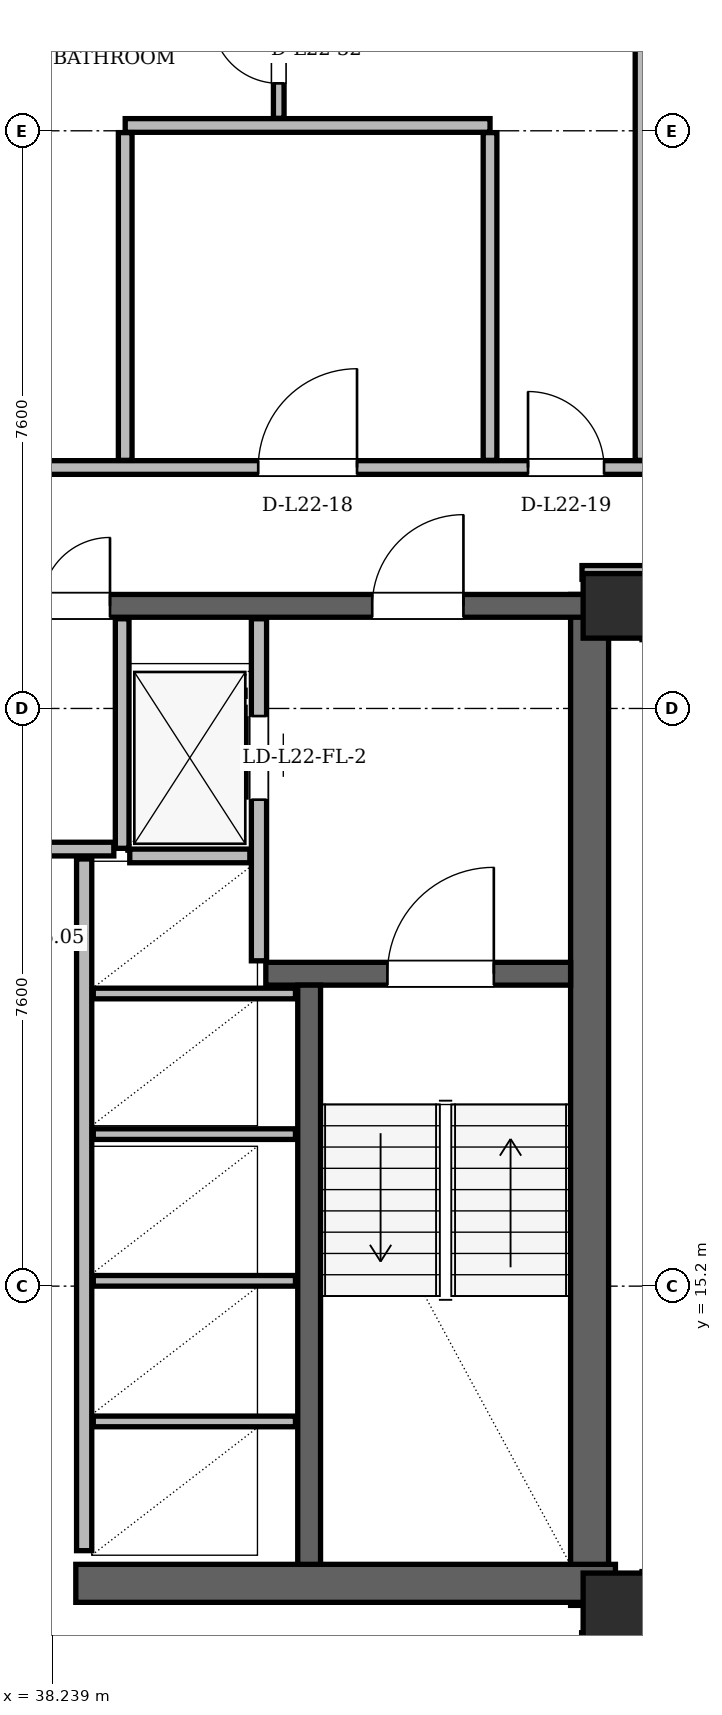
"""IFC4 building model, lengths in metres.
Left out: names, types, materials, properties, quantities, classifications, styles, units other than length and angle.
Written with IfcOpenShell. Run it as: python <this file> out.ifc"""

import sys

from ifc_helpers import new_model, si_unit, direction, frame, frame_2d, origin, origin_2d, place, context, subcontext, project, spatial, rectangle, hollow_rectangle, extrude, element, fill, save


model = new_model("IFC4")
c1 = context("Model", 3, precision=1e-05, world=origin(), true_north=direction((0.0, 1.0)))
c2 = subcontext(c1, "Body", "Model", "MODEL_VIEW")
j1 = project(units=[si_unit("LENGTHUNIT", "METRE"), si_unit("PLANEANGLEUNIT", "RADIAN")], contexts=[c1])
p1 = place(None, origin())
s1 = spatial("IfcSite", under=j1, at=p1, CompositionType="ELEMENT")
p2 = place(p1, origin())
s2 = spatial("IfcBuilding", under=s1, at=p2, CompositionType="ELEMENT")
p3 = place(p2, frame((0.0, 0.0, 86.1)))
s3 = spatial("IfcBuildingStorey", under=s2, at=p3, CompositionType="ELEMENT", Elevation=86.1)
for number, where, z_axis, x_axis in (
    (1, (45.65, 11.0, 0.0), (0.0, 0.0, 1.0), (1.0, 0.0, 0.0)),
    (2, (45.65, 24.15, 0.0), (0.0, 0.0, 1.0), (1.0, 0.0, 0.0)),
):
    element("IfcColumn", number, at=place(p3, frame(where, z_axis=z_axis, x_axis=x_axis)), inside=s3, PredefinedType="COLUMN", context=c2, shape_type="SweptSolid", body=[
        extrude(hollow_rectangle(XDim=0.85, YDim=0.85, WallThickness=0.07, at=origin_2d()), origin(), (0.0, 0.0, 1.0), 3.6),
    ])
p4 = place(p3, frame((45.31, 11.0, 0.0), z_axis=(0.0, 0.0, 1.0), x_axis=(0.0, 1.0, 0.0)))
e3 = element("IfcWall", 3, at=p4, inside=s3, PredefinedType="SHEAR", context=c2, shape_type="SweptSolid", body=[
    extrude(rectangle(XDim=13.3, YDim=0.5, at=frame_2d((6.65, 0.0))), origin(), (0.0, 0.0, 1.0), 3.36),
])
p5 = place(p3, frame((38.55, 11.29, 0.0), z_axis=(0.0, 0.0, 1.0), x_axis=(1.0, 0.0, 0.0)))
e4 = element("IfcWall", 4, at=p5, inside=s3, PredefinedType="SHEAR", context=c2, shape_type="SweptSolid", body=[
    extrude(rectangle(XDim=7.1, YDim=0.5, at=frame_2d((3.55, 0.0))), origin(), (0.0, 0.0, 1.0), 3.36),
])
p6 = place(p3, frame((29.65, 24.15, 0.0), z_axis=(0.0, 0.0, 1.0), x_axis=(1.0, 0.0, 0.0)))
e5 = element("IfcWall", 5, at=p6, inside=s3, PredefinedType="SHEAR", context=c2, shape_type="SweptSolid", body=[
    extrude(rectangle(XDim=15.7, YDim=0.3, at=frame_2d((7.85, 0.0))), origin(), (0.0, 0.0, 1.0), 3.36),
])
p7 = place(p6, frame((1.7, 0.0, 0.0)))
e6 = element("IfcOpeningElement", 6, at=p7, cuts=e5, PredefinedType="OPENING", context=c2, shape_type="SweptSolid", body=[
    extrude(rectangle(XDim=1.2, YDim=2.2, at=frame_2d((0.6, 1.1))), frame((0.0, 0.15, 0.0), z_axis=(0.0, -1.0, 0.0), x_axis=(1.0, 0.0, 0.0)), (0.0, 0.0, 1.0), 0.3),
])
p8 = place(p6, frame((12.8, 0.0, 0.0)))
e7 = element("IfcOpeningElement", 7, at=p8, cuts=e5, PredefinedType="OPENING", context=c2, shape_type="SweptSolid", body=[
    extrude(rectangle(XDim=1.2, YDim=2.2, at=frame_2d((0.6, 1.1))), frame((0.0, 0.15, 0.0), z_axis=(0.0, -1.0, 0.0), x_axis=(1.0, 0.0, 0.0)), (0.0, 0.0, 1.0), 0.3),
])
p9 = place(p6, frame((6.55, 0.0, 0.0)))
e8 = element("IfcOpeningElement", 8, at=p9, cuts=e5, PredefinedType="OPENING", context=c2, shape_type="SweptSolid", body=[
    extrude(rectangle(XDim=0.9, YDim=2.05, at=frame_2d((0.45, 1.025))), frame((0.0, 0.15, 0.0), z_axis=(0.0, -1.0, 0.0), x_axis=(1.0, 0.0, 0.0)), (0.0, 0.0, 1.0), 0.3),
])
p10 = place(p6, frame((8.45, 0.0, 0.0)))
e9 = element("IfcOpeningElement", 9, at=p10, cuts=e5, PredefinedType="OPENING", context=c2, shape_type="SweptSolid", body=[
    extrude(rectangle(XDim=0.9, YDim=2.05, at=frame_2d((0.45, 1.025))), frame((0.0, 0.15, 0.0), z_axis=(0.0, -1.0, 0.0), x_axis=(1.0, 0.0, 0.0)), (0.0, 0.0, 1.0), 0.3),
])
p11 = place(p3, frame((41.05, 19.31, 0.0), z_axis=(0.0, 0.0, 1.0), x_axis=(1.0, 0.0, 0.0)))
e10 = element("IfcWall", 10, at=p11, inside=s3, PredefinedType="SHEAR", context=c2, shape_type="SweptSolid", body=[
    extrude(rectangle(XDim=4.01, YDim=0.3, at=frame_2d((2.005, 0.0))), origin(), (0.0, 0.0, 1.0), 3.36),
])
p12 = place(p11, frame((1.6, 0.0, 0.0)))
e11 = element("IfcOpeningElement", 11, at=p12, cuts=e10, PredefinedType="OPENING", context=c2, shape_type="SweptSolid", body=[
    extrude(rectangle(XDim=1.4, YDim=2.2, at=frame_2d((0.7, 1.1))), frame((0.0, 0.15, 0.0), z_axis=(0.0, -1.0, 0.0), x_axis=(1.0, 0.0, 0.0)), (0.0, 0.0, 1.0), 0.3),
])
p13 = place(p3, frame((41.62, 11.54, 0.0), z_axis=(0.0, 0.0, 1.0), x_axis=(0.0, 1.0, 0.0)))
e12 = element("IfcWall", 12, at=p13, inside=s3, PredefinedType="SHEAR", context=c2, shape_type="SweptSolid", body=[
    extrude(rectangle(XDim=7.62, YDim=0.3, at=frame_2d((3.81, 0.0))), origin(), (0.0, 0.0, 1.0), 3.36),
])
p14 = place(p3, frame((60.917, 13.879, 0.0), z_axis=(0.0, 0.0, 1.0), x_axis=(-0.49999956034, 0.866025657622, 0.0)))
e13 = element("IfcWall", 13, at=p14, inside=s3, PredefinedType="SOLIDWALL", context=c2, shape_type="SweptSolid", body=[
    extrude(rectangle(XDim=34.192, YDim=0.34, at=frame_2d((17.096, 0.0))), origin(), (0.0, 0.0, 1.0), 2.578),
])
p15 = place(p14, frame((6.579, 0.0, 0.0)))
e14 = element("IfcOpeningElement", 14, at=p15, cuts=e13, PredefinedType="OPENING", context=c2, shape_type="SweptSolid", body=[
    extrude(rectangle(XDim=1.5, YDim=2.2, at=frame_2d((0.75, 1.1))), frame((0.0, 0.17, 0.0), z_axis=(0.0, -1.0, 0.0), x_axis=(1.0, 0.0, 0.0)), (0.0, 0.0, 1.0), 0.34),
])
p16 = place(p14, frame((24.868, 0.0, 0.0)))
e15 = element("IfcOpeningElement", 15, at=p16, cuts=e13, PredefinedType="OPENING", context=c2, shape_type="SweptSolid", body=[
    extrude(rectangle(XDim=1.5, YDim=2.2, at=frame_2d((0.75, 1.1))), frame((0.0, 0.17, 0.0), z_axis=(0.0, -1.0, 0.0), x_axis=(1.0, 0.0, 0.0)), (0.0, 0.0, 1.0), 0.34),
])
p17 = place(p14, frame((1.584, 0.0, 0.85)))
e16 = element("IfcOpeningElement", 16, at=p17, cuts=e13, PredefinedType="OPENING", context=c2, shape_type="SweptSolid", body=[
    extrude(rectangle(XDim=1.2, YDim=1.48, at=frame_2d((0.6, 0.74))), frame((0.0, 0.17, 0.0), z_axis=(0.0, -1.0, 0.0), x_axis=(1.0, 0.0, 0.0)), (0.0, 0.0, 1.0), 0.34),
])
p18 = place(p14, frame((30.611, 0.0, 0.85)))
e17 = element("IfcOpeningElement", 17, at=p18, cuts=e13, PredefinedType="OPENING", context=c2, shape_type="SweptSolid", body=[
    extrude(rectangle(XDim=2.5, YDim=1.618, at=frame_2d((1.25, 0.809))), frame((0.0, 0.17, 0.0), z_axis=(0.0, -1.0, 0.0), x_axis=(1.0, 0.0, 0.0)), (0.0, 0.0, 1.0), 0.34),
])
p19 = place(p14, frame((20.17, 0.0, 0.85)))
e18 = element("IfcOpeningElement", 18, at=p19, cuts=e13, PredefinedType="OPENING", context=c2, shape_type="SweptSolid", body=[
    extrude(rectangle(XDim=2.4, YDim=1.618, at=frame_2d((1.2, 0.809))), frame((0.0, 0.17, 0.0), z_axis=(0.0, -1.0, 0.0), x_axis=(1.0, 0.0, 0.0)), (0.0, 0.0, 1.0), 0.34),
])
p20 = place(p14, frame((26.841, 0.0, 0.85)))
e19 = element("IfcOpeningElement", 19, at=p20, cuts=e13, PredefinedType="OPENING", context=c2, shape_type="SweptSolid", body=[
    extrude(rectangle(XDim=1.2, YDim=1.48, at=frame_2d((0.6, 0.74))), frame((0.0, 0.17, 0.0), z_axis=(0.0, -1.0, 0.0), x_axis=(1.0, 0.0, 0.0)), (0.0, 0.0, 1.0), 0.34),
])
p21 = place(p14, frame((15.279, 0.0, 0.85)))
e20 = element("IfcOpeningElement", 20, at=p21, cuts=e13, PredefinedType="OPENING", context=c2, shape_type="SweptSolid", body=[
    extrude(rectangle(XDim=1.2, YDim=1.48, at=frame_2d((0.6, 0.74))), frame((0.0, 0.17, 0.0), z_axis=(0.0, -1.0, 0.0), x_axis=(1.0, 0.0, 0.0)), (0.0, 0.0, 1.0), 0.34),
])
p22 = place(p14, frame((17.873, 0.0, 0.85)))
e21 = element("IfcOpeningElement", 21, at=p22, cuts=e13, PredefinedType="OPENING", context=c2, shape_type="SweptSolid", body=[
    extrude(rectangle(XDim=1.2, YDim=1.48, at=frame_2d((0.6, 0.74))), frame((0.0, 0.17, 0.0), z_axis=(0.0, -1.0, 0.0), x_axis=(1.0, 0.0, 0.0)), (0.0, 0.0, 1.0), 0.34),
])
p23 = place(p3, frame((40.96, 19.48, 0.0), z_axis=(0.0, 0.0, 1.0), x_axis=(0.0, 1.0, 0.0)))
e22 = element("IfcWall", 22, at=p23, inside=s3, PredefinedType="PARTITIONING", context=c2, shape_type="SweptSolid", body=[
    extrude(rectangle(XDim=4.5, YDim=0.2, at=frame_2d((2.25, 0.0))), origin(), (0.0, 0.0, 1.0), 2.4),
])
p24 = place(p23, frame((2.12, 0.0, 0.0)))
e23 = element("IfcOpeningElement", 23, at=p24, cuts=e22, PredefinedType="OPENING", context=c2, shape_type="SweptSolid", body=[
    extrude(rectangle(XDim=1.1, YDim=2.2, at=frame_2d((0.55, 1.1))), frame((0.0, 0.1, 0.0), z_axis=(0.0, -1.0, 0.0), x_axis=(1.0, 0.0, 0.0)), (0.0, 0.0, 1.0), 0.2),
])
p25 = place(p3, frame((39.16, 20.96, 0.0), z_axis=(0.0, 0.0, 1.0), x_axis=(0.0, 1.0, 0.0)))
e24 = element("IfcWall", 24, at=p25, inside=s3, PredefinedType="PARTITIONING", context=c2, shape_type="SweptSolid", body=[
    extrude(rectangle(XDim=3.02, YDim=0.18, at=frame_2d((1.51, 0.0))), origin(), (0.0, 0.0, 1.0), 2.4),
])
p26 = place(p3, frame((39.26, 20.86, 0.0), z_axis=(0.0, 0.0, 1.0), x_axis=(1.0, 0.0, 0.0)))
e25 = element("IfcWall", 25, at=p26, inside=s3, PredefinedType="PARTITIONING", context=c2, shape_type="SweptSolid", body=[
    extrude(rectangle(XDim=1.58, YDim=0.18, at=frame_2d((0.79, 0.0))), origin(), (0.0, 0.0, 1.0), 3.36),
])
p27 = place(p3, frame((38.66, 11.72, 0.0), z_axis=(0.0, 0.0, 1.0), x_axis=(0.0, 1.0, 0.0)))
e26 = element("IfcWall", 26, at=p27, inside=s3, PredefinedType="PARTITIONING", context=c2, shape_type="SweptSolid", body=[
    extrude(rectangle(XDim=9.1, YDim=0.2, at=frame_2d((4.55, 0.0))), origin(), (0.0, 0.0, 1.0), 3.36),
])
for number, where, z_axis, x_axis in (
    (27, (38.78, 13.42, 0.0), (0.0, 0.0, 1.0), (1.0, 0.0, 0.0)),
    (28, (38.78, 15.27, 0.0), (0.0, 0.0, 1.0), (1.0, 0.0, 0.0)),
    (29, (38.78, 17.2, 0.0), (0.0, 0.0, 1.0), (1.0, 0.0, 0.0)),
    (30, (38.78, 19.05, 0.0), (0.0, 0.0, 1.0), (1.0, 0.0, 0.0)),
):
    element("IfcWall", number, at=place(p3, frame(where, z_axis=z_axis, x_axis=x_axis)), inside=s3, PredefinedType="PARTITIONING", context=c2, shape_type="SweptSolid", body=[
        extrude(rectangle(XDim=2.66, YDim=0.14, at=frame_2d((1.33, 0.0))), origin(), (0.0, 0.0, 1.0), 3.36),
    ])
p28 = place(p3, frame((35.95, 20.95, 0.0), z_axis=(0.0, 0.0, 1.0), x_axis=(1.0, 0.0, 0.0)))
e31 = element("IfcWall", 31, at=p28, inside=s3, PredefinedType="PARTITIONING", context=c2, shape_type="SweptSolid", body=[
    extrude(rectangle(XDim=3.1, YDim=0.18, at=frame_2d((1.55, 0.0))), origin(), (0.0, 0.0, 1.0), 3.36),
])
p29 = place(p3, frame((45.205, 10.55, 0.0), z_axis=(0.0, 0.0, 1.0), x_axis=(1.0, 0.0, 0.0)))
e32 = element("IfcWall", 32, at=p29, inside=s3, PredefinedType="PARTITIONING", context=c2, shape_type="SweptSolid", body=[
    extrude(rectangle(XDim=0.89, YDim=0.18, at=frame_2d((0.445, 0.0))), origin(), (0.0, 0.0, 1.0), 3.36),
])
p30 = place(p3, frame((45.21, 24.59, 0.0), z_axis=(0.0, 0.0, 1.0), x_axis=(1.0, 0.0, 0.0)))
e33 = element("IfcWall", 33, at=p30, inside=s3, PredefinedType="PARTITIONING", context=c2, shape_type="SweptSolid", body=[
    extrude(rectangle(XDim=0.88, YDim=0.18, at=frame_2d((0.44, 0.0))), origin(), (0.0, 0.0, 1.0), 2.814),
])
p31 = place(p3, frame((27.55, 25.97, 0.0), z_axis=(0.0, 0.0, 1.0), x_axis=(1.0, 0.0, 0.0)))
e34 = element("IfcWall", 34, at=p31, inside=s3, PredefinedType="PARTITIONING", context=c2, shape_type="SweptSolid", body=[
    extrude(rectangle(XDim=19.9, YDim=0.18, at=frame_2d((9.95, 0.0))), origin(), (0.0, 0.0, 1.0), 2.814),
])
p32 = place(p31, frame((0.425, 0.0, 0.0)))
e35 = element("IfcOpeningElement", 35, at=p32, cuts=e34, PredefinedType="OPENING", context=c2, shape_type="SweptSolid", body=[
    extrude(rectangle(XDim=1.0, YDim=2.18, at=frame_2d((0.5, 1.09))), frame((0.0, 0.09, 0.0), z_axis=(0.0, -1.0, 0.0), x_axis=(1.0, 0.0, 0.0)), (0.0, 0.0, 1.0), 0.18),
])
p33 = place(p31, frame((4.222, 0.0, 0.0)))
e36 = element("IfcOpeningElement", 36, at=p33, cuts=e34, PredefinedType="OPENING", context=c2, shape_type="SweptSolid", body=[
    extrude(rectangle(XDim=1.0, YDim=2.18, at=frame_2d((0.5, 1.09))), frame((0.0, 0.09, 0.0), z_axis=(0.0, -1.0, 0.0), x_axis=(1.0, 0.0, 0.0)), (0.0, 0.0, 1.0), 0.18),
])
p34 = place(p31, frame((13.4, 0.0, 0.0)))
e37 = element("IfcOpeningElement", 37, at=p34, cuts=e34, PredefinedType="OPENING", context=c2, shape_type="SweptSolid", body=[
    extrude(rectangle(XDim=1.3, YDim=2.2, at=frame_2d((0.65, 1.1))), frame((0.0, 0.09, 0.0), z_axis=(0.0, -1.0, 0.0), x_axis=(1.0, 0.0, 0.0)), (0.0, 0.0, 1.0), 0.18),
])
p35 = place(p31, frame((16.95, 0.0, 0.0)))
e38 = element("IfcOpeningElement", 38, at=p35, cuts=e34, PredefinedType="OPENING", context=c2, shape_type="SweptSolid", body=[
    extrude(rectangle(XDim=1.0, YDim=2.18, at=frame_2d((0.5, 1.09))), frame((0.0, 0.09, 0.0), z_axis=(0.0, -1.0, 0.0), x_axis=(1.0, 0.0, 0.0)), (0.0, 0.0, 1.0), 0.18),
])
p36 = place(p3, frame((39.2, 30.47, 0.0), z_axis=(0.0, 0.0, 1.0), x_axis=(1.0, 0.0, 0.0)))
e39 = element("IfcWall", 39, at=p36, inside=s3, PredefinedType="PARTITIONING", context=c2, shape_type="SweptSolid", body=[
    extrude(rectangle(XDim=4.8, YDim=0.18, at=frame_2d((2.4, 0.0))), origin(), (0.0, 0.0, 1.0), 3.36),
])
p37 = place(p3, frame((39.2, 26.064, 0.0), z_axis=(0.0, 0.0, 1.0), x_axis=(0.0, 1.0, 0.0)))
e40 = element("IfcWall", 40, at=p37, inside=s3, PredefinedType="PARTITIONING", context=c2, shape_type="SweptSolid", body=[
    extrude(rectangle(XDim=4.312, YDim=0.18, at=frame_2d((2.156, 0.0))), origin(), (0.0, 0.0, 1.0), 3.36),
])
p38 = place(p3, frame((41.22, 30.564, 0.0), z_axis=(0.0, 0.0, 1.0), x_axis=(0.0, 1.0, 0.0)))
e41 = element("IfcWall", 41, at=p38, inside=s3, PredefinedType="PARTITIONING", context=c2, shape_type="SweptSolid", body=[
    extrude(rectangle(XDim=12.752, YDim=0.14, at=frame_2d((6.376, 0.0))), origin(), (0.0, 0.0, 1.0), 3.36),
])
p39 = place(p38, frame((0.46, 0.0, 0.0)))
e42 = element("IfcOpeningElement", 42, at=p39, cuts=e41, PredefinedType="OPENING", context=c2, shape_type="SweptSolid", body=[
    extrude(rectangle(XDim=0.88, YDim=2.08, at=frame_2d((0.44, 1.04))), frame((0.0, 0.07, 0.0), z_axis=(0.0, -1.0, 0.0), x_axis=(1.0, 0.0, 0.0)), (0.0, 0.0, 1.0), 0.14),
])
p40 = place(p38, frame((2.494, 0.0, 0.0)))
e43 = element("IfcOpeningElement", 43, at=p40, cuts=e41, PredefinedType="OPENING", context=c2, shape_type="SweptSolid", body=[
    extrude(rectangle(XDim=0.95, YDim=2.1, at=frame_2d((0.475, 1.05))), frame((0.0, 0.07, 0.0), z_axis=(0.0, -1.0, 0.0), x_axis=(1.0, 0.0, 0.0)), (0.0, 0.0, 1.0), 0.14),
])
p41 = place(p38, frame((4.726, 0.0, 0.0)))
e44 = element("IfcOpeningElement", 44, at=p41, cuts=e41, PredefinedType="OPENING", context=c2, shape_type="SweptSolid", body=[
    extrude(rectangle(XDim=0.95, YDim=2.1, at=frame_2d((0.475, 1.05))), frame((0.0, 0.07, 0.0), z_axis=(0.0, -1.0, 0.0), x_axis=(1.0, 0.0, 0.0)), (0.0, 0.0, 1.0), 0.14),
])
p42 = place(p38, frame((7.467, 0.0, 0.0)))
e45 = element("IfcOpeningElement", 45, at=p42, cuts=e41, PredefinedType="OPENING", context=c2, shape_type="SweptSolid", body=[
    extrude(rectangle(XDim=0.92, YDim=2.12, at=frame_2d((0.46, 1.06))), frame((0.0, 0.07, 0.0), z_axis=(0.0, -1.0, 0.0), x_axis=(1.0, 0.0, 0.0)), (0.0, 0.0, 1.0), 0.14),
])
p43 = place(p38, frame((10.676, 0.0, 0.0)))
e46 = element("IfcOpeningElement", 46, at=p43, cuts=e41, PredefinedType="OPENING", context=c2, shape_type="SweptSolid", body=[
    extrude(rectangle(XDim=0.92, YDim=2.12, at=frame_2d((0.46, 1.06))), frame((0.0, 0.07, 0.0), z_axis=(0.0, -1.0, 0.0), x_axis=(1.0, 0.0, 0.0)), (0.0, 0.0, 1.0), 0.14),
])
p44 = place(p3, frame((44.0, 26.064, 0.0), z_axis=(0.0, 0.0, 1.0), x_axis=(0.0, 1.0, 0.0)))
e47 = element("IfcWall", 47, at=p44, inside=s3, PredefinedType="PARTITIONING", context=c2, shape_type="SweptSolid", body=[
    extrude(rectangle(XDim=4.312, YDim=0.18, at=frame_2d((2.156, 0.0))), origin(), (0.0, 0.0, 1.0), 2.946),
])
p45 = place(p3, frame((46.0, 26.064, 0.0), z_axis=(0.0, 0.0, 1.0), x_axis=(0.0, 1.0, 0.0)))
e48 = element("IfcWall", 48, at=p45, inside=s3, PredefinedType="PARTITIONING", context=c2, shape_type="SweptSolid", body=[
    extrude(rectangle(XDim=13.305, YDim=0.18, at=frame_2d((6.652, 0.0))), origin(), (0.0, 0.0, 1.0), 2.578),
])
p46 = place(p24, origin())
e49 = element("IfcDoor", 49, at=p46, inside=s3, OperationType="SLIDING_TO_RIGHT", PredefinedType="DOOR", context=c2, shape_type="SweptSolid", body=[
    extrude(rectangle(XDim=1.1, YDim=2.2, at=frame_2d((0.55, 1.1))), frame((0.0, 0.025, 0.0), z_axis=(0.0, -1.0, 0.0), x_axis=(1.0, 0.0, 0.0)), (0.0, 0.0, 1.0), 0.05),
])
fill(e23, e49)
p47 = place(p12, origin())
e50 = element("IfcDoor", 50, at=p47, inside=s3, OperationType="SINGLE_SWING_RIGHT", PredefinedType="DOOR", context=c2, shape_type="SweptSolid", body=[
    extrude(rectangle(XDim=1.4, YDim=2.2, at=frame_2d((0.7, 1.1))), frame((0.0, 0.025, 0.0), z_axis=(0.0, -1.0, 0.0), x_axis=(1.0, 0.0, 0.0)), (0.0, 0.0, 1.0), 0.05),
])
fill(e11, e50)
p48 = place(p8, origin())
e51 = element("IfcDoor", 51, at=p48, inside=s3, OperationType="SINGLE_SWING_RIGHT", PredefinedType="DOOR", context=c2, shape_type="SweptSolid", body=[
    extrude(rectangle(XDim=1.2, YDim=2.2, at=frame_2d((0.6, 1.1))), frame((0.0, 0.025, 0.0), z_axis=(0.0, -1.0, 0.0), x_axis=(1.0, 0.0, 0.0)), (0.0, 0.0, 1.0), 0.05),
])
fill(e7, e51)
p49 = place(p10, origin())
e52 = element("IfcDoor", 52, at=p49, inside=s3, OperationType="SINGLE_SWING_RIGHT", PredefinedType="DOOR", context=c2, shape_type="SweptSolid", body=[
    extrude(rectangle(XDim=0.9, YDim=2.05, at=frame_2d((0.45, 1.025))), frame((0.0, 0.025, 0.0), z_axis=(0.0, -1.0, 0.0), x_axis=(1.0, 0.0, 0.0)), (0.0, 0.0, 1.0), 0.05),
])
fill(e9, e52)
p50 = place(p34, origin())
e53 = element("IfcDoor", 53, at=p50, inside=s3, OperationType="SINGLE_SWING_RIGHT", PredefinedType="DOOR", context=c2, shape_type="SweptSolid", body=[
    extrude(rectangle(XDim=1.3, YDim=2.2, at=frame_2d((0.65, 1.1))), frame((0.0, 0.025, 0.0), z_axis=(0.0, -1.0, 0.0), x_axis=(1.0, 0.0, 0.0)), (0.0, 0.0, 1.0), 0.05),
])
fill(e37, e53)
p51 = place(p35, origin())
e54 = element("IfcDoor", 54, at=p51, inside=s3, OperationType="SINGLE_SWING_LEFT", PredefinedType="DOOR", context=c2, shape_type="SweptSolid", body=[
    extrude(rectangle(XDim=1.0, YDim=2.18, at=frame_2d((0.5, 1.09))), frame((0.0, 0.025, 0.0), z_axis=(0.0, -1.0, 0.0), x_axis=(1.0, 0.0, 0.0)), (0.0, 0.0, 1.0), 0.05),
])
fill(e38, e54)
p52 = place(p39, origin())
e55 = element("IfcDoor", 55, at=p52, inside=s3, OperationType="SINGLE_SWING_RIGHT", PredefinedType="DOOR", context=c2, shape_type="SweptSolid", body=[
    extrude(rectangle(XDim=0.88, YDim=2.08, at=frame_2d((0.44, 1.04))), frame((0.0, 0.025, 0.0), z_axis=(0.0, -1.0, 0.0), x_axis=(1.0, 0.0, 0.0)), (0.0, 0.0, 1.0), 0.05),
])
fill(e42, e55)
save(model, sys.argv[1])
